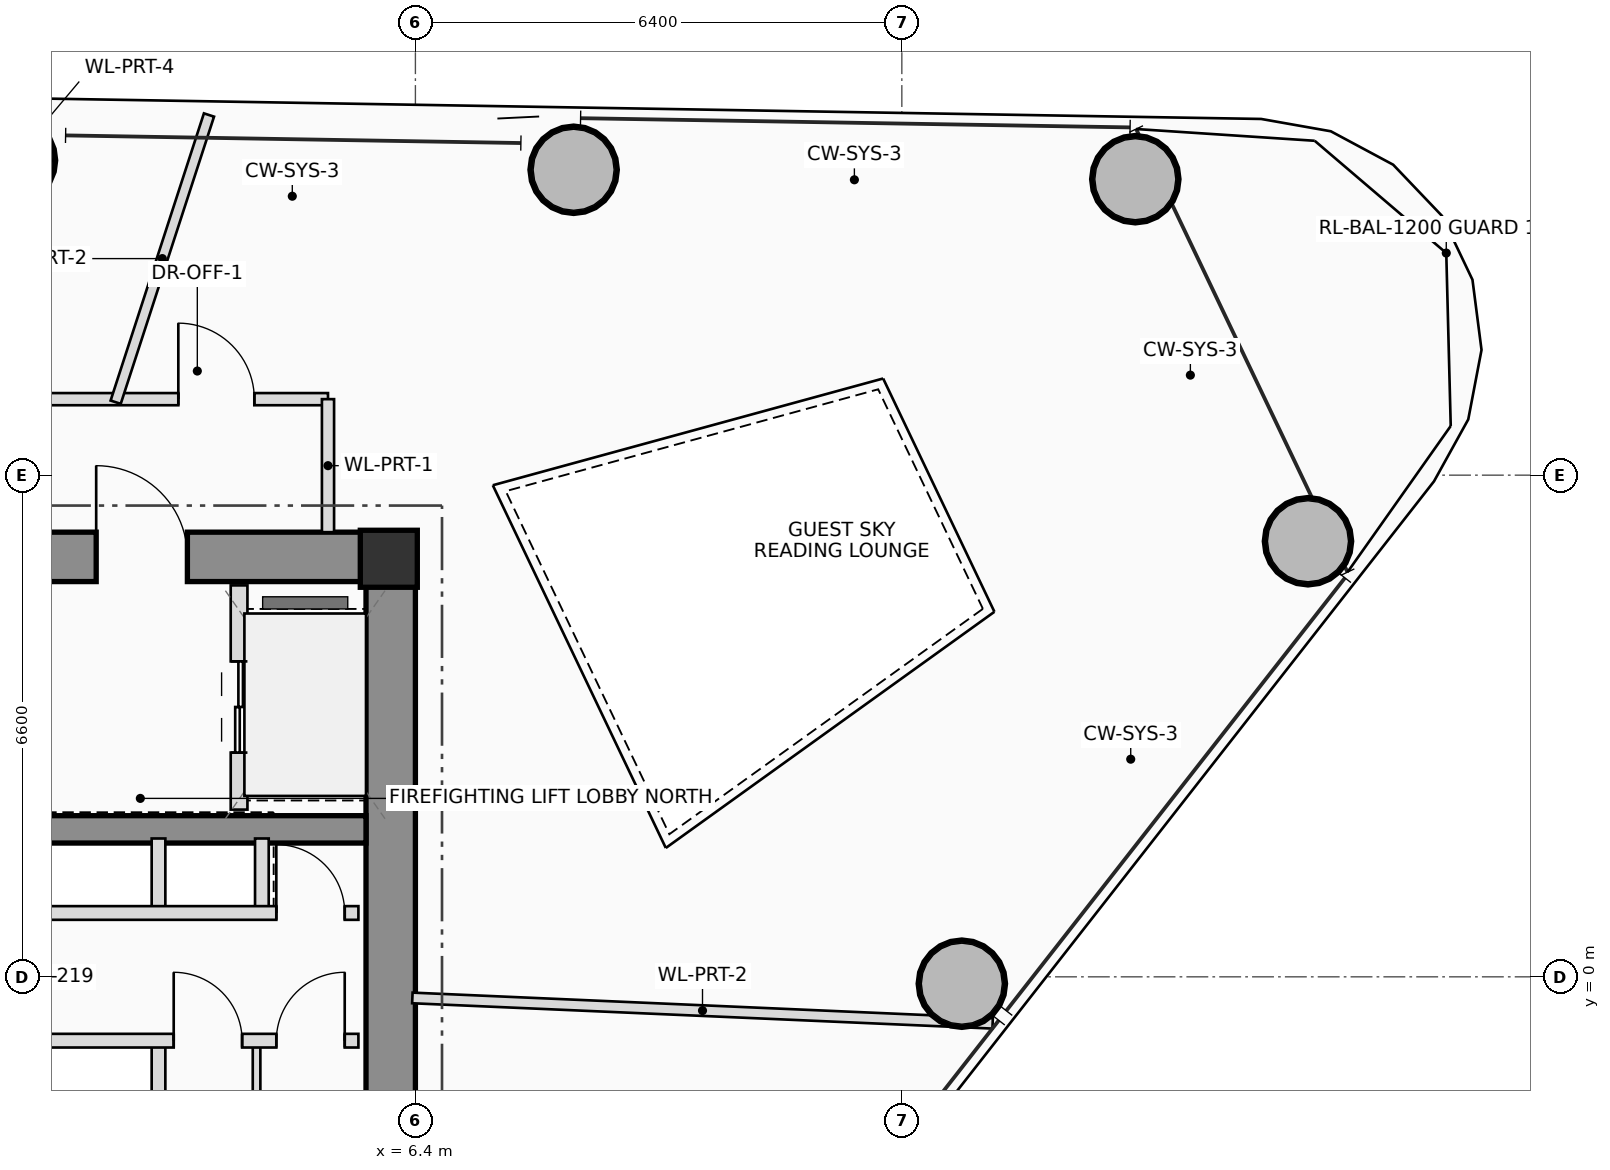
"""IFC4 building model, lengths in metres.
Left out: names, types, materials, properties, quantities, classifications, styles, units other than length and angle.
Written with IfcOpenShell. Run it as: python <this file> out.ifc"""

import sys

from ifc_helpers import new_model, si_unit, direction, frame, frame_2d, origin, origin_2d, place, context, subcontext, project, spatial, rectangle, hollow_circle, extrude, source, transform, mapped, element, fill, save


model = new_model("IFC4")
c1 = context("Model", 3, precision=1e-05, world=origin(), true_north=direction((0.0, 1.0)))
c2 = subcontext(c1, "Body", "Model", "MODEL_VIEW")
j1 = project(units=[si_unit("LENGTHUNIT", "METRE"), si_unit("PLANEANGLEUNIT", "RADIAN")], contexts=[c1])
p1 = place(None, origin())
s1 = spatial("IfcSite", under=j1, at=p1, CompositionType="ELEMENT")
p2 = place(p1, origin())
s2 = spatial("IfcBuilding", under=s1, at=p2, CompositionType="ELEMENT")
p3 = place(p2, frame((0.0, 0.0, 212.15)))
s3 = spatial("IfcBuildingStorey", under=s2, at=p3, CompositionType="ELEMENT", Elevation=212.15)
m1 = source(origin(), c2, "Body", "SweptSolid", [
    extrude(rectangle(XDim=0.75, YDim=0.75, at=origin_2d()), origin(), (0.0, 0.0, 1.0), 3.45),
])
p4 = place(p3, frame((6.05, 5.5, 0.0), z_axis=(0.0, 0.0, 1.0), x_axis=(1.0, 0.0, 0.0)))
e1 = element("IfcColumn", 1, at=p4, inside=s3, PredefinedType="COLUMN", context=c2, shape_type="MappedRepresentation", body=[
    mapped(m1, transform((0.0, 0.0, 0.0), scale=1.0)),
])
p5 = place(p3, frame((-6.4, 5.525, 0.0), z_axis=(0.0, 0.0, 1.0), x_axis=(1.0, 0.0, 0.0)))
e2 = element("IfcWall", 2, at=p5, inside=s3, PredefinedType="SHEAR", context=c2, shape_type="SweptSolid", body=[
    extrude(rectangle(XDim=12.8, YDim=0.65, at=frame_2d((6.4, 0.0))), origin(), (0.0, 0.0, 1.0), 3.45),
])
p6 = place(p5, frame((8.6, 0.0, 0.0)))
e3 = element("IfcOpeningElement", 3, at=p6, cuts=e2, PredefinedType="OPENING", context=c2, shape_type="SweptSolid", body=[
    extrude(rectangle(XDim=1.2, YDim=2.2, at=frame_2d((0.6, 1.1))), frame((0.0, 0.335, 0.0), z_axis=(0.0, -1.0, 0.0), x_axis=(1.0, 0.0, 0.0)), (0.0, 0.0, 1.0), 0.67),
])
p7 = place(p3, frame((6.075, -5.2, 0.0), z_axis=(0.0, 0.0, 1.0), x_axis=(0.0, 1.0, 0.0)))
e4 = element("IfcWall", 4, at=p7, inside=s3, PredefinedType="SHEAR", context=c2, shape_type="SweptSolid", body=[
    extrude(rectangle(XDim=10.4, YDim=0.65, at=frame_2d((5.2, 0.0))), origin(), (0.0, 0.0, 1.0), 3.45),
])
p8 = place(p3, frame((-5.75, 1.94, 0.0), z_axis=(0.0, 0.0, 1.0), x_axis=(1.0, 0.0, 0.0)))
e5 = element("IfcWall", 5, at=p8, inside=s3, PredefinedType="SHEAR", context=c2, shape_type="SweptSolid", body=[
    extrude(rectangle(XDim=11.5, YDim=0.36, at=frame_2d((5.75, 0.0))), origin(), (0.0, 0.0, 1.0), 3.45),
])
m2 = source(origin(), c2, "Body", "SweptSolid", [
    extrude(hollow_circle(Radius=0.575, WallThickness=0.042, at=origin_2d()), origin(), (0.0, 0.0, 1.0), 3.45),
])
for number, where, z_axis, x_axis in (
    (6, (13.59, -0.09, 0.0), (0.0, 0.0, 1.0), (1.0, 0.0, 0.0)),
    (7, (18.144, 5.731, 0.0), (0.0, 0.0, 1.0), (1.0, 0.0, 0.0)),
    (8, (15.872, 10.494, 0.0), (0.0, 0.0, 1.0), (1.0, 0.0, 0.0)),
    (9, (8.482, 10.618, 0.0), (0.0, 0.0, 1.0), (1.0, 0.0, 0.0)),
    (10, (1.092, 10.742, 0.0), (0.0, 0.0, 1.0), (1.0, 0.0, 0.0)),
):
    element("IfcColumn", number, at=place(p3, frame(where, z_axis=z_axis, x_axis=x_axis)), inside=s3, PredefinedType="COLUMN", context=c2, shape_type="MappedRepresentation", body=[
        mapped(m2, transform((0.0, 0.0, 0.0), scale=1.0)),
    ])
p9 = place(p3, frame((4.08, 2.2, 0.0), z_axis=(0.0, 0.0, 1.0), x_axis=(0.0, 1.0, 0.0)))
e11 = element("IfcWall", 11, at=p9, inside=s3, PredefinedType="PLUMBINGWALL", context=c2, shape_type="SweptSolid", body=[
    extrude(rectangle(XDim=2.95, YDim=0.22, at=frame_2d((1.475, 0.0))), origin(), (0.0, 0.0, 1.0), 3.25),
])
p10 = place(p9, frame((0.75, 0.0, 0.0)))
e12 = element("IfcOpeningElement", 12, at=p10, cuts=e11, PredefinedType="OPENING", context=c2, shape_type="SweptSolid", body=[
    extrude(rectangle(XDim=1.2, YDim=2.25, at=frame_2d((0.6, 1.125))), frame((0.0, 0.12, 0.0), z_axis=(0.0, -1.0, 0.0), x_axis=(1.0, 0.0, 0.0)), (0.0, 0.0, 1.0), 0.24),
])
for number, where, z_axis, x_axis in (
    (13, (3.02, 0.84, 0.0), (0.0, 0.0, 1.0), (0.0, 1.0, 0.0)),
    (14, (4.38, 0.84, 0.0), (0.0, 0.0, 1.0), (0.0, 1.0, 0.0)),
    (15, (3.02, -1.82, 0.0), (0.0, 0.0, 1.0), (0.0, 1.0, 0.0)),
):
    element("IfcWall", number, at=place(p3, frame(where, z_axis=z_axis, x_axis=x_axis)), inside=s3, PredefinedType="PLUMBINGWALL", context=c2, shape_type="SweptSolid", body=[
        extrude(rectangle(XDim=0.98, YDim=0.18, at=frame_2d((0.49, 0.0))), origin(), (0.0, 0.0, 1.0), 3.25),
    ])
p11 = place(p3, frame((4.31, -1.82, 0.0), z_axis=(0.0, 0.0, 1.0), x_axis=(0.0, 1.0, 0.0)))
e16 = element("IfcWall", 16, at=p11, inside=s3, PredefinedType="PARTITIONING", context=c2, shape_type="SweptSolid", body=[
    extrude(rectangle(XDim=0.98, YDim=0.1, at=frame_2d((0.49, 0.0))), origin(), (0.0, 0.0, 1.0), 3.25),
])
p12 = place(p3, frame((-5.68, 0.84, 0.0), z_axis=(0.0, 0.0, 1.0), x_axis=(1.0, 0.0, 0.0)))
e17 = element("IfcWall", 17, at=p12, inside=s3, PredefinedType="PLUMBINGWALL", context=c2, shape_type="SweptSolid", body=[
    extrude(rectangle(XDim=11.33, YDim=0.18, at=frame_2d((5.665, 0.0))), origin(), (0.0, 0.0, 1.0), 3.25),
])
p13 = place(p12, frame((1.58, 0.0, 0.0)))
e18 = element("IfcOpeningElement", 18, at=p13, cuts=e17, PredefinedType="OPENING", context=c2, shape_type="SweptSolid", body=[
    extrude(rectangle(XDim=0.92, YDim=2.1, at=frame_2d((0.46, 1.05))), frame((0.0, 0.1, 0.0), z_axis=(0.0, -1.0, 0.0), x_axis=(1.0, 0.0, 0.0)), (0.0, 0.0, 1.0), 0.2),
])
p14 = place(p12, frame((3.93, 0.0, 0.0)))
e19 = element("IfcOpeningElement", 19, at=p14, cuts=e17, PredefinedType="OPENING", context=c2, shape_type="SweptSolid", body=[
    extrude(rectangle(XDim=1.1, YDim=2.2, at=frame_2d((0.55, 1.1))), frame((0.0, 0.1, 0.0), z_axis=(0.0, -1.0, 0.0), x_axis=(1.0, 0.0, 0.0)), (0.0, 0.0, 1.0), 0.2),
])
p15 = place(p12, frame((5.63, 0.0, 0.0)))
e20 = element("IfcOpeningElement", 20, at=p15, cuts=e17, PredefinedType="OPENING", context=c2, shape_type="SweptSolid", body=[
    extrude(rectangle(XDim=1.1, YDim=2.2, at=frame_2d((0.55, 1.1))), frame((0.0, 0.1, 0.0), z_axis=(0.0, -1.0, 0.0), x_axis=(1.0, 0.0, 0.0)), (0.0, 0.0, 1.0), 0.2),
])
p16 = place(p12, frame((10.25, 0.0, 0.0)))
e21 = element("IfcOpeningElement", 21, at=p16, cuts=e17, PredefinedType="OPENING", context=c2, shape_type="SweptSolid", body=[
    extrude(rectangle(XDim=0.9, YDim=2.05, at=frame_2d((0.45, 1.025))), frame((0.0, 0.1, 0.0), z_axis=(0.0, -1.0, 0.0), x_axis=(1.0, 0.0, 0.0)), (0.0, 0.0, 1.0), 0.2),
])
p17 = place(p3, frame((-5.68, -0.84, 0.0), z_axis=(0.0, 0.0, 1.0), x_axis=(1.0, 0.0, 0.0)))
e22 = element("IfcWall", 22, at=p17, inside=s3, PredefinedType="PLUMBINGWALL", context=c2, shape_type="SweptSolid", body=[
    extrude(rectangle(XDim=11.33, YDim=0.18, at=frame_2d((5.665, 0.0))), origin(), (0.0, 0.0, 1.0), 3.25),
])
p18 = place(p17, frame((1.18, 0.0, 0.0)))
e23 = element("IfcOpeningElement", 23, at=p18, cuts=e22, PredefinedType="OPENING", context=c2, shape_type="SweptSolid", body=[
    extrude(rectangle(XDim=0.9, YDim=2.05, at=frame_2d((0.45, 1.025))), frame((0.0, 0.1, 0.0), z_axis=(0.0, -1.0, 0.0), x_axis=(1.0, 0.0, 0.0)), (0.0, 0.0, 1.0), 0.2),
])
p19 = place(p17, frame((3.93, 0.0, 0.0)))
e24 = element("IfcOpeningElement", 24, at=p19, cuts=e22, PredefinedType="OPENING", context=c2, shape_type="SweptSolid", body=[
    extrude(rectangle(XDim=1.1, YDim=2.2, at=frame_2d((0.55, 1.1))), frame((0.0, 0.1, 0.0), z_axis=(0.0, -1.0, 0.0), x_axis=(1.0, 0.0, 0.0)), (0.0, 0.0, 1.0), 0.2),
])
p20 = place(p17, frame((5.63, 0.0, 0.0)))
e25 = element("IfcOpeningElement", 25, at=p20, cuts=e22, PredefinedType="OPENING", context=c2, shape_type="SweptSolid", body=[
    extrude(rectangle(XDim=1.1, YDim=2.2, at=frame_2d((0.55, 1.1))), frame((0.0, 0.1, 0.0), z_axis=(0.0, -1.0, 0.0), x_axis=(1.0, 0.0, 0.0)), (0.0, 0.0, 1.0), 0.2),
])
p21 = place(p17, frame((8.9, 0.0, 0.0)))
e26 = element("IfcOpeningElement", 26, at=p21, cuts=e22, PredefinedType="OPENING", context=c2, shape_type="SweptSolid", body=[
    extrude(rectangle(XDim=0.9, YDim=2.05, at=frame_2d((0.45, 1.025))), frame((0.0, 0.1, 0.0), z_axis=(0.0, -1.0, 0.0), x_axis=(1.0, 0.0, 0.0)), (0.0, 0.0, 1.0), 0.2),
])
p22 = place(p17, frame((10.25, 0.0, 0.0)))
e27 = element("IfcOpeningElement", 27, at=p22, cuts=e22, PredefinedType="OPENING", context=c2, shape_type="SweptSolid", body=[
    extrude(rectangle(XDim=0.9, YDim=2.05, at=frame_2d((0.45, 1.025))), frame((0.0, 0.1, 0.0), z_axis=(0.0, -1.0, 0.0), x_axis=(1.0, 0.0, 0.0)), (0.0, 0.0, 1.0), 0.2),
])
p23 = place(p3, frame((-6.36, 7.6, 0.0), z_axis=(0.0, 0.0, 1.0), x_axis=(1.0, 0.0, 0.0)))
e28 = element("IfcWall", 28, at=p23, inside=s3, PredefinedType="PARTITIONING", context=c2, shape_type="SweptSolid", body=[
    extrude(rectangle(XDim=11.61, YDim=0.16, at=frame_2d((5.805, 0.0))), origin(), (0.0, 0.0, 1.0), 2.605),
])
p24 = place(p23, frame((5.479, 0.0, 0.0)))
e29 = element("IfcOpeningElement", 29, at=p24, cuts=e28, PredefinedType="OPENING", context=c2, shape_type="SweptSolid", body=[
    extrude(rectangle(XDim=1.05, YDim=2.2, at=frame_2d((0.525, 1.1))), frame((0.0, 0.09, 0.0), z_axis=(0.0, -1.0, 0.0), x_axis=(1.0, 0.0, 0.0)), (0.0, 0.0, 1.0), 0.18),
])
p25 = place(p23, frame((9.641, 0.0, 0.0)))
e30 = element("IfcOpeningElement", 30, at=p25, cuts=e28, PredefinedType="OPENING", context=c2, shape_type="SweptSolid", body=[
    extrude(rectangle(XDim=1.0, YDim=2.25, at=frame_2d((0.5, 1.125))), frame((0.0, 0.09, 0.0), z_axis=(0.0, -1.0, 0.0), x_axis=(1.0, 0.0, 0.0)), (0.0, 0.0, 1.0), 0.18),
])
p26 = place(p3, frame((5.25, 7.6, 0.0), z_axis=(0.0, 0.0, 1.0), x_axis=(0.0, -1.0, 0.0)))
e31 = element("IfcWall", 31, at=p26, inside=s3, PredefinedType="PARTITIONING", context=c2, shape_type="SweptSolid", body=[
    extrude(rectangle(XDim=1.75, YDim=0.16, at=frame_2d((0.875, 0.0))), origin(), (0.0, 0.0, 1.0), 2.605),
])
p27 = place(p3, frame((6.36, -0.278, 0.0), z_axis=(0.0, 0.0, 1.0), x_axis=(0.999047276506, -0.04364102778, 0.0)))
e32 = element("IfcWall", 32, at=p27, inside=s3, PredefinedType="PARTITIONING", context=c2, shape_type="SweptSolid", body=[
    extrude(rectangle(XDim=7.642, YDim=0.14, at=frame_2d((3.821, 0.0))), origin(), (0.0, 0.0, 1.0), 2.605),
])
p28 = place(p3, frame((2.456, 7.56, 0.0), z_axis=(0.0, 0.0, 1.0), x_axis=(0.30904716458, 0.951046712872, 0.0)))
e33 = element("IfcWall", 33, at=p28, inside=s3, PredefinedType="PARTITIONING", context=c2, shape_type="SweptSolid", body=[
    extrude(rectangle(XDim=3.973, YDim=0.14, at=frame_2d((1.986, 0.0))), origin(), (0.0, 0.0, 1.0), 2.605),
])
p29 = place(p6, origin())
e34 = element("IfcDoor", 34, at=p29, inside=s3, OperationType="SINGLE_SWING_LEFT", PredefinedType="DOOR", context=c2, shape_type="SweptSolid", body=[
    extrude(rectangle(XDim=1.2, YDim=2.2, at=frame_2d((0.6, 1.1))), frame((0.0, 0.025, 0.0), z_axis=(0.0, -1.0, 0.0), x_axis=(1.0, 0.0, 0.0)), (0.0, 0.0, 1.0), 0.05),
])
fill(e3, e34)
p30 = place(p10, origin())
e35 = element("IfcDoor", 35, at=p30, inside=s3, OperationType="DOUBLE_DOOR_SLIDING", PredefinedType="DOOR", context=c2, shape_type="SweptSolid", body=[
    extrude(rectangle(XDim=1.2, YDim=2.25, at=frame_2d((0.6, 1.125))), frame((0.0, 0.025, 0.0), z_axis=(0.0, -1.0, 0.0), x_axis=(1.0, 0.0, 0.0)), (0.0, 0.0, 1.0), 0.05),
])
fill(e12, e35)
p31 = place(p16, origin())
e36 = element("IfcDoor", 36, at=p31, inside=s3, OperationType="SINGLE_SWING_LEFT", PredefinedType="DOOR", context=c2, shape_type="SweptSolid", body=[
    extrude(rectangle(XDim=0.9, YDim=2.05, at=frame_2d((0.45, 1.025))), frame((0.0, 0.025, 0.0), z_axis=(0.0, -1.0, 0.0), x_axis=(1.0, 0.0, 0.0)), (0.0, 0.0, 1.0), 0.05),
])
fill(e21, e36)
p32 = place(p21, origin())
e37 = element("IfcDoor", 37, at=p32, inside=s3, OperationType="SINGLE_SWING_LEFT", PredefinedType="DOOR", context=c2, shape_type="SweptSolid", body=[
    extrude(rectangle(XDim=0.9, YDim=2.05, at=frame_2d((0.45, 1.025))), frame((0.0, 0.025, 0.0), z_axis=(0.0, -1.0, 0.0), x_axis=(1.0, 0.0, 0.0)), (0.0, 0.0, 1.0), 0.05),
])
fill(e26, e37)
p33 = place(p22, origin())
e38 = element("IfcDoor", 38, at=p33, inside=s3, OperationType="SINGLE_SWING_RIGHT", PredefinedType="DOOR", context=c2, shape_type="SweptSolid", body=[
    extrude(rectangle(XDim=0.9, YDim=2.05, at=frame_2d((0.45, 1.025))), frame((0.0, 0.025, 0.0), z_axis=(0.0, -1.0, 0.0), x_axis=(1.0, 0.0, 0.0)), (0.0, 0.0, 1.0), 0.05),
])
fill(e27, e38)
p34 = place(p25, origin())
e39 = element("IfcDoor", 39, at=p34, inside=s3, OperationType="SINGLE_SWING_LEFT", PredefinedType="DOOR", context=c2, shape_type="SweptSolid", body=[
    extrude(rectangle(XDim=1.0, YDim=2.25, at=frame_2d((0.5, 1.125))), frame((0.0, 0.025, 0.0), z_axis=(0.0, -1.0, 0.0), x_axis=(1.0, 0.0, 0.0)), (0.0, 0.0, 1.0), 0.05),
])
fill(e30, e39)
save(model, sys.argv[1])
